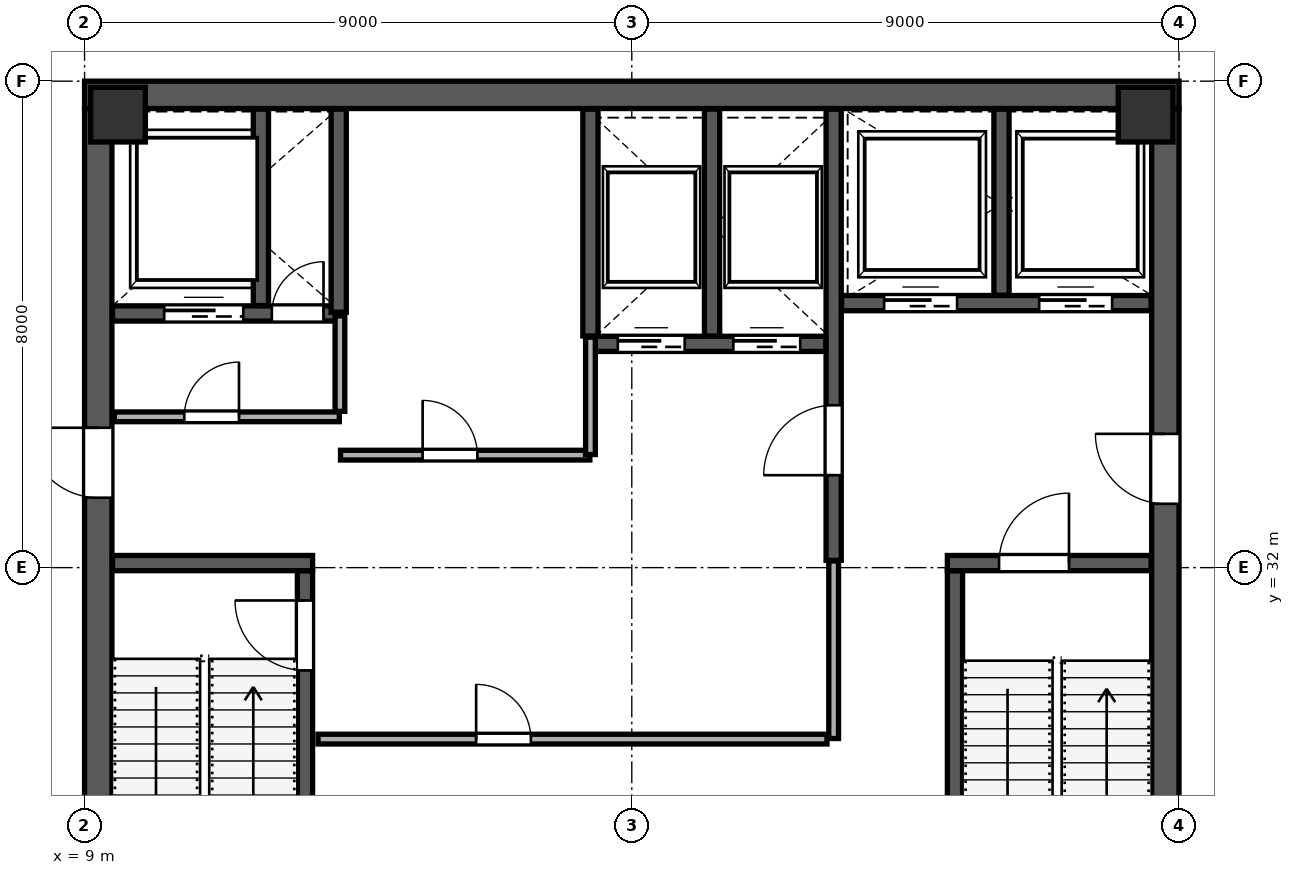
"""IFC4 building model, lengths in metres.
Left out: names, types, materials, properties, quantities, classifications, styles, units other than length and angle.
Written with IfcOpenShell. Run it as: python <this file> out.ifc"""

import sys

from ifc_helpers import new_model, si_unit, direction, frame, frame_2d, origin, origin_2d, place, context, subcontext, project, spatial, rectangle, extrude, source, transform, mapped, element, fill, save


model = new_model("IFC4")
c1 = context("Model", 3, precision=1e-05, world=origin(), true_north=direction((0.0, 1.0)))
c2 = subcontext(c1, "Body", "Model", "MODEL_VIEW")
j1 = project(units=[si_unit("LENGTHUNIT", "METRE"), si_unit("PLANEANGLEUNIT", "RADIAN")], contexts=[c1])
p1 = place(None, origin())
s1 = spatial("IfcSite", under=j1, at=p1, CompositionType="ELEMENT")
p2 = place(p1, origin())
s2 = spatial("IfcBuilding", under=s1, at=p2, CompositionType="ELEMENT")
p3 = place(p2, frame((0.0, 0.0, 283.6)))
s3 = spatial("IfcBuildingStorey", under=s2, at=p3, CompositionType="ELEMENT", Elevation=283.6)
m1 = source(origin(), c2, "Body", "SweptSolid", [
    extrude(rectangle(XDim=0.9, YDim=0.9, at=origin_2d()), origin(), (0.0, 0.0, 1.0), 4.198),
])
for number, where, z_axis, x_axis in (
    (1, (9.55, 39.45, 0.001), (0.0, 0.0, 1.0), (1.0, 0.0, 0.0)),
    (2, (26.45, 39.45, 0.001), (0.0, 0.0, 1.0), (1.0, 0.0, 0.0)),
):
    element("IfcColumn", number, at=place(p3, frame(where, z_axis=z_axis, x_axis=x_axis)), inside=s3, PredefinedType="COLUMN", context=c2, shape_type="MappedRepresentation", body=[
        mapped(m1, transform((0.0, 0.0, 0.0), scale=1.0)),
    ])
p4 = place(p3, frame((9.225, 24.45, 0.0), z_axis=(0.0, 0.0, 1.0), x_axis=(0.0, 1.0, 0.0)))
e3 = element("IfcWall", 3, at=p4, inside=s3, PredefinedType="SHEAR", context=c2, shape_type="SweptSolid", body=[
    extrude(rectangle(XDim=15.1, YDim=0.45, at=frame_2d((7.55, 0.0))), origin(), (0.0, 0.0, 1.0), 3.92),
])
p5 = place(p4, frame((8.7, 0.0, 0.0)))
e4 = element("IfcOpeningElement", 4, at=p5, cuts=e3, PredefinedType="OPENING", context=c2, shape_type="SweptSolid", body=[
    extrude(rectangle(XDim=1.15, YDim=2.2, at=frame_2d((0.575, 1.1))), frame((0.0, 0.235, 0.0), z_axis=(0.0, -1.0, 0.0), x_axis=(1.0, 0.0, 0.0)), (0.0, 0.0, 1.0), 0.47),
])
p6 = place(p3, frame((26.775, 24.45, 0.0), z_axis=(0.0, 0.0, 1.0), x_axis=(0.0, 1.0, 0.0)))
e5 = element("IfcWall", 5, at=p6, inside=s3, PredefinedType="SHEAR", context=c2, shape_type="SweptSolid", body=[
    extrude(rectangle(XDim=15.1, YDim=0.45, at=frame_2d((7.55, 0.0))), origin(), (0.0, 0.0, 1.0), 3.92),
])
p7 = place(p6, frame((8.6, 0.0, 0.0)))
e6 = element("IfcOpeningElement", 6, at=p7, cuts=e5, PredefinedType="OPENING", context=c2, shape_type="SweptSolid", body=[
    extrude(rectangle(XDim=1.15, YDim=2.2, at=frame_2d((0.575, 1.1))), frame((0.0, 0.235, 0.0), z_axis=(0.0, -1.0, 0.0), x_axis=(1.0, 0.0, 0.0)), (0.0, 0.0, 1.0), 0.47),
])
p8 = place(p3, frame((9.0, 39.775, 0.0), z_axis=(0.0, 0.0, 1.0), x_axis=(1.0, 0.0, 0.0)))
e7 = element("IfcWall", 7, at=p8, inside=s3, PredefinedType="SHEAR", context=c2, shape_type="SweptSolid", body=[
    extrude(rectangle(XDim=18.0, YDim=0.45, at=frame_2d((9.0, 0.0))), origin(), (0.0, 0.0, 1.0), 3.92),
])
p9 = place(p3, frame((12.625, 24.46, 0.0), z_axis=(0.0, 0.0, 1.0), x_axis=(0.0, 1.0, 0.0)))
e8 = element("IfcWall", 8, at=p9, inside=s3, PredefinedType="SHEAR", context=c2, shape_type="SweptSolid", body=[
    extrude(rectangle(XDim=7.49, YDim=0.25, at=frame_2d((3.745, 0.0))), origin(), (0.0, 0.0, 1.0), 3.92),
])
p10 = place(p9, frame((5.85, 0.0, 0.0)))
e9 = element("IfcOpeningElement", 9, at=p10, cuts=e8, PredefinedType="OPENING", context=c2, shape_type="SweptSolid", body=[
    extrude(rectangle(XDim=1.15, YDim=2.2, at=frame_2d((0.575, 1.1))), frame((0.0, 0.135, 0.0), z_axis=(0.0, -1.0, 0.0), x_axis=(1.0, 0.0, 0.0)), (0.0, 0.0, 1.0), 0.27),
])
p11 = place(p3, frame((9.46, 32.075, 0.0), z_axis=(0.0, 0.0, 1.0), x_axis=(1.0, 0.0, 0.0)))
e10 = element("IfcWall", 10, at=p11, inside=s3, PredefinedType="SHEAR", context=c2, shape_type="SweptSolid", body=[
    extrude(rectangle(XDim=3.29, YDim=0.25, at=frame_2d((1.645, 0.0))), origin(), (0.0, 0.0, 1.0), 3.92),
])
p12 = place(p3, frame((23.315, 24.46, 0.0), z_axis=(0.0, 0.0, 1.0), x_axis=(0.0, 1.0, 0.0)))
e11 = element("IfcWall", 11, at=p12, inside=s3, PredefinedType="SHEAR", context=c2, shape_type="SweptSolid", body=[
    extrude(rectangle(XDim=7.49, YDim=0.25, at=frame_2d((3.745, 0.0))), origin(), (0.0, 0.0, 1.0), 3.92),
])
p13 = place(p3, frame((23.19, 32.075, 0.0), z_axis=(0.0, 0.0, 1.0), x_axis=(1.0, 0.0, 0.0)))
e12 = element("IfcWall", 12, at=p13, inside=s3, PredefinedType="SHEAR", context=c2, shape_type="SweptSolid", body=[
    extrude(rectangle(XDim=3.35, YDim=0.25, at=frame_2d((1.675, 0.0))), origin(), (0.0, 0.0, 1.0), 3.92),
])
p14 = place(p13, frame((0.85, 0.0, 0.0)))
e13 = element("IfcOpeningElement", 13, at=p14, cuts=e12, PredefinedType="OPENING", context=c2, shape_type="SweptSolid", body=[
    extrude(rectangle(XDim=1.15, YDim=2.2, at=frame_2d((0.575, 1.1))), frame((0.0, 0.135, 0.0), z_axis=(0.0, -1.0, 0.0), x_axis=(1.0, 0.0, 0.0)), (0.0, 0.0, 1.0), 0.27),
])
p15 = place(p3, frame((21.32, 32.12, 0.0), z_axis=(0.0, 0.0, 1.0), x_axis=(0.0, 1.0, 0.0)))
e14 = element("IfcWall", 14, at=p15, inside=s3, PredefinedType="SHEAR", context=c2, shape_type="SweptSolid", body=[
    extrude(rectangle(XDim=7.42, YDim=0.25, at=frame_2d((3.71, 0.0))), origin(), (0.0, 0.0, 1.0), 3.92),
])
p16 = place(p15, frame((1.4, 0.0, 0.0)))
e15 = element("IfcOpeningElement", 15, at=p16, cuts=e14, PredefinedType="OPENING", context=c2, shape_type="SweptSolid", body=[
    extrude(rectangle(XDim=1.15, YDim=2.2, at=frame_2d((0.575, 1.1))), frame((0.0, 0.135, 0.0), z_axis=(0.0, -1.0, 0.0), x_axis=(1.0, 0.0, 0.0)), (0.0, 0.0, 1.0), 0.27),
])
p17 = place(p3, frame((9.46, 36.18, 0.0), z_axis=(0.0, 0.0, 1.0), x_axis=(1.0, 0.0, 0.0)))
e16 = element("IfcWall", 16, at=p17, inside=s3, PredefinedType="SHEAR", context=c2, shape_type="SweptSolid", body=[
    extrude(rectangle(XDim=3.79, YDim=0.25, at=frame_2d((1.895, 0.0))), origin(), (0.0, 0.0, 1.0), 3.92),
])
p18 = place(p17, frame((2.62, 0.0, 0.0)))
e17 = element("IfcOpeningElement", 17, at=p18, cuts=e16, PredefinedType="OPENING", context=c2, shape_type="SweptSolid", body=[
    extrude(rectangle(XDim=0.85, YDim=2.1, at=frame_2d((0.425, 1.05))), frame((0.0, 0.135, 0.0), z_axis=(0.0, -1.0, 0.0), x_axis=(1.0, 0.0, 0.0)), (0.0, 0.0, 1.0), 0.27),
])
p19 = place(p17, frame((0.85, 0.0, 0.0)))
e18 = element("IfcOpeningElement", 18, at=p19, cuts=e16, PredefinedType="OPENING", context=c2, shape_type="SweptSolid", body=[
    extrude(rectangle(XDim=1.3, YDim=2.25, at=frame_2d((0.65, 1.125))), frame((0.0, 0.135, 0.0), z_axis=(0.0, -1.0, 0.0), x_axis=(1.0, 0.0, 0.0)), (0.0, 0.0, 1.0), 0.27),
])
p20 = place(p3, frame((11.9, 36.31, 0.0), z_axis=(0.0, 0.0, 1.0), x_axis=(0.0, 1.0, 0.0)))
e19 = element("IfcWall", 19, at=p20, inside=s3, PredefinedType="SHEAR", context=c2, shape_type="SweptSolid", body=[
    extrude(rectangle(XDim=3.23, YDim=0.25, at=frame_2d((1.615, 0.0))), origin(), (0.0, 0.0, 1.0), 3.92),
])
p21 = place(p3, frame((21.45, 36.35, 0.0), z_axis=(0.0, 0.0, 1.0), x_axis=(1.0, 0.0, 0.0)))
e20 = element("IfcWall", 20, at=p21, inside=s3, PredefinedType="SHEAR", context=c2, shape_type="SweptSolid", body=[
    extrude(rectangle(XDim=5.09, YDim=0.25, at=frame_2d((2.545, 0.0))), origin(), (0.0, 0.0, 1.0), 3.92),
])
p22 = place(p21, frame((0.7, 0.0, 0.0)))
e21 = element("IfcOpeningElement", 21, at=p22, cuts=e20, PredefinedType="OPENING", context=c2, shape_type="SweptSolid", body=[
    extrude(rectangle(XDim=1.2, YDim=2.2, at=frame_2d((0.6, 1.1))), frame((0.0, 0.135, 0.0), z_axis=(0.0, -1.0, 0.0), x_axis=(1.0, 0.0, 0.0)), (0.0, 0.0, 1.0), 0.27),
])
p23 = place(p21, frame((3.25, 0.0, 0.0)))
e22 = element("IfcOpeningElement", 22, at=p23, cuts=e20, PredefinedType="OPENING", context=c2, shape_type="SweptSolid", body=[
    extrude(rectangle(XDim=1.2, YDim=2.2, at=frame_2d((0.6, 1.1))), frame((0.0, 0.135, 0.0), z_axis=(0.0, -1.0, 0.0), x_axis=(1.0, 0.0, 0.0)), (0.0, 0.0, 1.0), 0.27),
])
p24 = place(p3, frame((24.08, 36.48, 0.0), z_axis=(0.0, 0.0, 1.0), x_axis=(0.0, 1.0, 0.0)))
e23 = element("IfcWall", 23, at=p24, inside=s3, PredefinedType="SHEAR", context=c2, shape_type="SweptSolid", body=[
    extrude(rectangle(XDim=3.06, YDim=0.25, at=frame_2d((1.53, 0.0))), origin(), (0.0, 0.0, 1.0), 3.92),
])
p25 = place(p3, frame((13.18, 36.2, 0.0), z_axis=(0.0, 0.0, 1.0), x_axis=(0.0, 1.0, 0.0)))
e24 = element("IfcWall", 24, at=p25, inside=s3, PredefinedType="SHEAR", context=c2, shape_type="SweptSolid", body=[
    extrude(rectangle(XDim=3.34, YDim=0.25, at=frame_2d((1.67, 0.0))), origin(), (0.0, 0.0, 1.0), 3.92),
])
p26 = place(p3, frame((17.32, 35.68, 0.0), z_axis=(0.0, 0.0, 1.0), x_axis=(1.0, 0.0, 0.0)))
e25 = element("IfcWall", 25, at=p26, inside=s3, PredefinedType="SHEAR", context=c2, shape_type="SweptSolid", body=[
    extrude(rectangle(XDim=3.87, YDim=0.25, at=frame_2d((1.935, 0.0))), origin(), (0.0, 0.0, 1.0), 3.92),
])
p27 = place(p26, frame((0.45, 0.0, 0.0)))
e26 = element("IfcOpeningElement", 26, at=p27, cuts=e25, PredefinedType="OPENING", context=c2, shape_type="SweptSolid", body=[
    extrude(rectangle(XDim=1.1, YDim=2.2, at=frame_2d((0.55, 1.1))), frame((0.0, 0.135, 0.0), z_axis=(0.0, -1.0, 0.0), x_axis=(1.0, 0.0, 0.0)), (0.0, 0.0, 1.0), 0.27),
])
p28 = place(p26, frame((2.35, 0.0, 0.0)))
e27 = element("IfcOpeningElement", 27, at=p28, cuts=e25, PredefinedType="OPENING", context=c2, shape_type="SweptSolid", body=[
    extrude(rectangle(XDim=1.1, YDim=2.2, at=frame_2d((0.55, 1.1))), frame((0.0, 0.135, 0.0), z_axis=(0.0, -1.0, 0.0), x_axis=(1.0, 0.0, 0.0)), (0.0, 0.0, 1.0), 0.27),
])
for number, where, z_axis, x_axis in (
    (28, (17.32, 35.81, 0.0), (0.0, 0.0, 1.0), (0.0, 1.0, 0.0)),
    (29, (19.32, 35.81, 0.0), (0.0, 0.0, 1.0), (0.0, 1.0, 0.0)),
):
    element("IfcWall", number, at=place(p3, frame(where, z_axis=z_axis, x_axis=x_axis)), inside=s3, PredefinedType="SHEAR", context=c2, shape_type="SweptSolid", body=[
        extrude(rectangle(XDim=3.73, YDim=0.25, at=frame_2d((1.865, 0.0))), origin(), (0.0, 0.0, 1.0), 3.92),
    ])
p29 = place(p3, frame((9.49, 34.48, 0.0), z_axis=(0.0, 0.0, 1.0), x_axis=(1.0, 0.0, 0.0)))
e30 = element("IfcWall", 30, at=p29, inside=s3, PredefinedType="PARTITIONING", context=c2, shape_type="SweptSolid", body=[
    extrude(rectangle(XDim=3.7, YDim=0.16, at=frame_2d((1.85, 0.0))), origin(), (0.0, 0.0, 1.0), 3.92),
])
p30 = place(p29, frame((1.15, 0.0, 0.0)))
e31 = element("IfcOpeningElement", 31, at=p30, cuts=e30, PredefinedType="OPENING", context=c2, shape_type="SweptSolid", body=[
    extrude(rectangle(XDim=0.9, YDim=2.15, at=frame_2d((0.45, 1.075))), frame((0.0, 0.09, 0.0), z_axis=(0.0, -1.0, 0.0), x_axis=(1.0, 0.0, 0.0)), (0.0, 0.0, 1.0), 0.18),
])
p31 = place(p3, frame((13.2, 34.57, 0.0), z_axis=(0.0, 0.0, 1.0), x_axis=(0.0, 1.0, 0.0)))
e32 = element("IfcWall", 32, at=p31, inside=s3, PredefinedType="PARTITIONING", context=c2, shape_type="SweptSolid", body=[
    extrude(rectangle(XDim=1.57, YDim=0.16, at=frame_2d((0.785, 0.0))), origin(), (0.0, 0.0, 1.0), 3.92),
])
p32 = place(p3, frame((13.21, 33.85, 0.0), z_axis=(0.0, 0.0, 1.0), x_axis=(1.0, 0.0, 0.0)))
e33 = element("IfcWall", 33, at=p32, inside=s3, PredefinedType="PARTITIONING", context=c2, shape_type="SweptSolid", body=[
    extrude(rectangle(XDim=4.1, YDim=0.16, at=frame_2d((2.05, 0.0))), origin(), (0.0, 0.0, 1.0), 3.92),
])
p33 = place(p32, frame((1.35, 0.0, 0.0)))
e34 = element("IfcOpeningElement", 34, at=p33, cuts=e33, PredefinedType="OPENING", context=c2, shape_type="SweptSolid", body=[
    extrude(rectangle(XDim=0.9, YDim=2.15, at=frame_2d((0.45, 1.075))), frame((0.0, 0.09, 0.0), z_axis=(0.0, -1.0, 0.0), x_axis=(1.0, 0.0, 0.0)), (0.0, 0.0, 1.0), 0.18),
])
p34 = place(p3, frame((17.32, 33.86, 0.0), z_axis=(0.0, 0.0, 1.0), x_axis=(0.0, 1.0, 0.0)))
e35 = element("IfcWall", 35, at=p34, inside=s3, PredefinedType="PARTITIONING", context=c2, shape_type="SweptSolid", body=[
    extrude(rectangle(XDim=1.93, YDim=0.16, at=frame_2d((0.965, 0.0))), origin(), (0.0, 0.0, 1.0), 3.92),
])
p35 = place(p3, frame((12.84, 29.18, 0.0), z_axis=(0.0, 0.0, 1.0), x_axis=(1.0, 0.0, 0.0)))
e36 = element("IfcWall", 36, at=p35, inside=s3, PredefinedType="PARTITIONING", context=c2, shape_type="SweptSolid", body=[
    extrude(rectangle(XDim=8.37, YDim=0.16, at=frame_2d((4.185, 0.0))), origin(), (0.0, 0.0, 1.0), 3.92),
])
p36 = place(p35, frame((2.6, 0.0, 0.0)))
e37 = element("IfcOpeningElement", 37, at=p36, cuts=e36, PredefinedType="OPENING", context=c2, shape_type="SweptSolid", body=[
    extrude(rectangle(XDim=0.9, YDim=2.15, at=frame_2d((0.45, 1.075))), frame((0.0, 0.09, 0.0), z_axis=(0.0, -1.0, 0.0), x_axis=(1.0, 0.0, 0.0)), (0.0, 0.0, 1.0), 0.18),
])
p37 = place(p3, frame((21.32, 29.19, 0.0), z_axis=(0.0, 0.0, 1.0), x_axis=(0.0, 1.0, 0.0)))
e38 = element("IfcWall", 38, at=p37, inside=s3, PredefinedType="PARTITIONING", context=c2, shape_type="SweptSolid", body=[
    extrude(rectangle(XDim=2.92, YDim=0.16, at=frame_2d((1.46, 0.0))), origin(), (0.0, 0.0, 1.0), 3.92),
])
p38 = place(p3, frame((3.853, 30.194, 0.0), z_axis=(0.0, 0.0, 1.0), x_axis=(0.608748677634, -0.793363124603, 0.0)))
e39 = element("IfcWall", 39, at=p38, inside=s3, PredefinedType="PARTITIONING", context=c2, shape_type="SweptSolid", body=[
    extrude(rectangle(XDim=11.57, YDim=0.16, at=frame_2d((5.785, 0.0))), origin(), (0.0, 0.0, 1.0), 3.92),
])
p39 = place(p38, frame((1.15, 0.0, 0.0)))
e40 = element("IfcOpeningElement", 40, at=p39, cuts=e39, PredefinedType="OPENING", context=c2, shape_type="SweptSolid", body=[
    extrude(rectangle(XDim=0.95, YDim=2.15, at=frame_2d((0.475, 1.075))), frame((0.0, 0.09, 0.0), z_axis=(0.0, -1.0, 0.0), x_axis=(1.0, 0.0, 0.0)), (0.0, 0.0, 1.0), 0.18),
])
p40 = place(p3, frame((20.518, 50.922, 0.0), z_axis=(0.0, 0.0, 1.0), x_axis=(0.608759693778, -0.793354671778, 0.0)))
e41 = element("IfcWall", 41, at=p40, inside=s3, PredefinedType="PARTITIONING", context=c2, shape_type="SweptSolid", body=[
    extrude(rectangle(XDim=26.97, YDim=0.135, at=frame_2d((13.485, 0.0))), origin(), (0.0, 0.0, 1.0), 3.92),
])
p41 = place(p40, frame((5.4, 0.0, 0.0)))
e42 = element("IfcOpeningElement", 42, at=p41, cuts=e41, PredefinedType="OPENING", context=c2, shape_type="SweptSolid", body=[
    extrude(rectangle(XDim=0.95, YDim=2.15, at=frame_2d((0.475, 1.075))), frame((0.0, 0.078, 0.0), z_axis=(0.0, -1.0, 0.0), x_axis=(1.0, 0.0, 0.0)), (0.0, 0.0, 1.0), 0.155),
])
p42 = place(p3, frame((1.519, 35.764, 0.0), z_axis=(0.0, 0.0, 1.0), x_axis=(0.793353184068, 0.608761632602, 0.0)))
e43 = element("IfcWall", 43, at=p42, inside=s3, PredefinedType="PARTITIONING", context=c2, shape_type="SweptSolid", body=[
    extrude(rectangle(XDim=27.572, YDim=0.1, at=frame_2d((13.786, 0.0))), origin(), (0.0, 0.0, 1.0), 3.92),
])
p43 = place(p3, frame((25.092, 20.387, 0.0), z_axis=(0.0, 0.0, 1.0), x_axis=(0.793357014217, 0.608756641025, 0.0)))
e44 = element("IfcWall", 44, at=p43, inside=s3, PredefinedType="PARTITIONING", context=c2, shape_type="SweptSolid", body=[
    extrude(rectangle(XDim=20.24, YDim=0.16, at=frame_2d((10.12, 0.0))), origin(), (0.0, 0.0, 1.0), 3.155),
])
m2 = source(origin(), c2, "Body", "SweptSolid", [
    extrude(rectangle(XDim=1.15, YDim=2.2, at=frame_2d((0.575, 1.1))), frame((0.0, 0.025, 0.0), z_axis=(0.0, -1.0, 0.0), x_axis=(1.0, 0.0, 0.0)), (0.0, 0.0, 1.0), 0.05),
])
p44 = place(p10, origin())
e45 = element("IfcDoor", 45, at=p44, inside=s3, OperationType="SINGLE_SWING_RIGHT", PredefinedType="DOOR", context=c2, shape_type="MappedRepresentation", body=[
    mapped(m2, transform((0.0, 0.0, 0.0), scale=1.0)),
])
fill(e9, e45)
m3 = source(origin(), c2, "Body", "SweptSolid", [
    extrude(rectangle(XDim=1.15, YDim=2.2, at=frame_2d((0.575, 1.1))), frame((0.0, 0.025, 0.0), z_axis=(0.0, -1.0, 0.0), x_axis=(1.0, 0.0, 0.0)), (0.0, 0.0, 1.0), 0.05),
])
p45 = place(p16, origin())
e46 = element("IfcDoor", 46, at=p45, inside=s3, OperationType="SINGLE_SWING_LEFT", PredefinedType="DOOR", context=c2, shape_type="MappedRepresentation", body=[
    mapped(m3, transform((0.0, 0.0, 0.0), scale=1.0)),
])
fill(e15, e46)
p46 = place(p14, origin())
e47 = element("IfcDoor", 47, at=p46, inside=s3, OperationType="SINGLE_SWING_RIGHT", PredefinedType="DOOR", context=c2, shape_type="MappedRepresentation", body=[
    mapped(m2, transform((0.0, 0.0, 0.0), scale=1.0)),
])
fill(e13, e47)
p47 = place(p7, origin())
e48 = element("IfcDoor", 48, at=p47, inside=s3, OperationType="SINGLE_SWING_RIGHT", PredefinedType="DOOR", context=c2, shape_type="MappedRepresentation", body=[
    mapped(m3, transform((0.0, 0.0, 0.0), scale=1.0)),
])
fill(e6, e48)
p48 = place(p5, origin())
e49 = element("IfcDoor", 49, at=p48, inside=s3, OperationType="SINGLE_SWING_RIGHT", PredefinedType="DOOR", context=c2, shape_type="MappedRepresentation", body=[
    mapped(m3, transform((0.0, 0.0, 0.0), scale=1.0)),
])
fill(e4, e49)
m4 = source(origin(), c2, "Body", "SweptSolid", [
    extrude(rectangle(XDim=0.85, YDim=2.1, at=frame_2d((0.425, 1.05))), frame((0.0, 0.025, 0.0), z_axis=(0.0, -1.0, 0.0), x_axis=(1.0, 0.0, 0.0)), (0.0, 0.0, 1.0), 0.05),
])
p49 = place(p18, origin())
e50 = element("IfcDoor", 50, at=p49, inside=s3, OperationType="SINGLE_SWING_RIGHT", PredefinedType="DOOR", context=c2, shape_type="MappedRepresentation", body=[
    mapped(m4, transform((0.0, 0.0, 0.0), scale=1.0)),
])
fill(e17, e50)
m5 = source(origin(), c2, "Body", "SweptSolid", [
    extrude(rectangle(XDim=1.1, YDim=2.2, at=frame_2d((0.55, 1.1))), frame((0.0, 0.025, 0.0), z_axis=(0.0, -1.0, 0.0), x_axis=(1.0, 0.0, 0.0)), (0.0, 0.0, 1.0), 0.05),
])
p50 = place(p27, origin())
e51 = element("IfcDoor", 51, at=p50, inside=s3, OperationType="SLIDING_TO_LEFT", PredefinedType="DOOR", context=c2, shape_type="MappedRepresentation", body=[
    mapped(m5, transform((0.0, 0.0, 0.0), scale=1.0)),
])
fill(e26, e51)
p51 = place(p28, origin())
e52 = element("IfcDoor", 52, at=p51, inside=s3, OperationType="SLIDING_TO_RIGHT", PredefinedType="DOOR", context=c2, shape_type="MappedRepresentation", body=[
    mapped(m5, transform((0.0, 0.0, 0.0), scale=1.0)),
])
fill(e27, e52)
m6 = source(origin(), c2, "Body", "SweptSolid", [
    extrude(rectangle(XDim=1.2, YDim=2.2, at=frame_2d((0.6, 1.1))), frame((0.0, 0.025, 0.0), z_axis=(0.0, -1.0, 0.0), x_axis=(1.0, 0.0, 0.0)), (0.0, 0.0, 1.0), 0.05),
])
p52 = place(p22, origin())
e53 = element("IfcDoor", 53, at=p52, inside=s3, OperationType="SLIDING_TO_LEFT", PredefinedType="DOOR", context=c2, shape_type="MappedRepresentation", body=[
    mapped(m6, transform((0.0, 0.0, 0.0), scale=1.0)),
])
fill(e21, e53)
p53 = place(p23, origin())
e54 = element("IfcDoor", 54, at=p53, inside=s3, OperationType="SLIDING_TO_RIGHT", PredefinedType="DOOR", context=c2, shape_type="MappedRepresentation", body=[
    mapped(m6, transform((0.0, 0.0, 0.0), scale=1.0)),
])
fill(e22, e54)
m7 = source(origin(), c2, "Body", "SweptSolid", [
    extrude(rectangle(XDim=1.3, YDim=2.25, at=frame_2d((0.65, 1.125))), frame((0.0, 0.025, 0.0), z_axis=(0.0, -1.0, 0.0), x_axis=(1.0, 0.0, 0.0)), (0.0, 0.0, 1.0), 0.05),
])
p54 = place(p19, origin())
e55 = element("IfcDoor", 55, at=p54, inside=s3, OperationType="SLIDING_TO_LEFT", PredefinedType="DOOR", context=c2, shape_type="MappedRepresentation", body=[
    mapped(m7, transform((0.0, 0.0, 0.0), scale=1.0)),
])
fill(e18, e55)
m8 = source(origin(), c2, "Body", "SweptSolid", [
    extrude(rectangle(XDim=0.9, YDim=2.15, at=frame_2d((0.45, 1.075))), frame((0.0, 0.025, 0.0), z_axis=(0.0, -1.0, 0.0), x_axis=(1.0, 0.0, 0.0)), (0.0, 0.0, 1.0), 0.05),
])
p55 = place(p30, origin())
e56 = element("IfcDoor", 56, at=p55, inside=s3, OperationType="SINGLE_SWING_RIGHT", PredefinedType="DOOR", context=c2, shape_type="MappedRepresentation", body=[
    mapped(m8, transform((0.0, 0.0, 0.0), scale=1.0)),
])
fill(e31, e56)
p56 = place(p33, origin())
e57 = element("IfcDoor", 57, at=p56, inside=s3, OperationType="SINGLE_SWING_LEFT", PredefinedType="DOOR", context=c2, shape_type="MappedRepresentation", body=[
    mapped(m8, transform((0.0, 0.0, 0.0), scale=1.0)),
])
fill(e34, e57)
p57 = place(p36, origin())
e58 = element("IfcDoor", 58, at=p57, inside=s3, OperationType="SINGLE_SWING_LEFT", PredefinedType="DOOR", context=c2, shape_type="MappedRepresentation", body=[
    mapped(m8, transform((0.0, 0.0, 0.0), scale=1.0)),
])
fill(e37, e58)
save(model, sys.argv[1])
